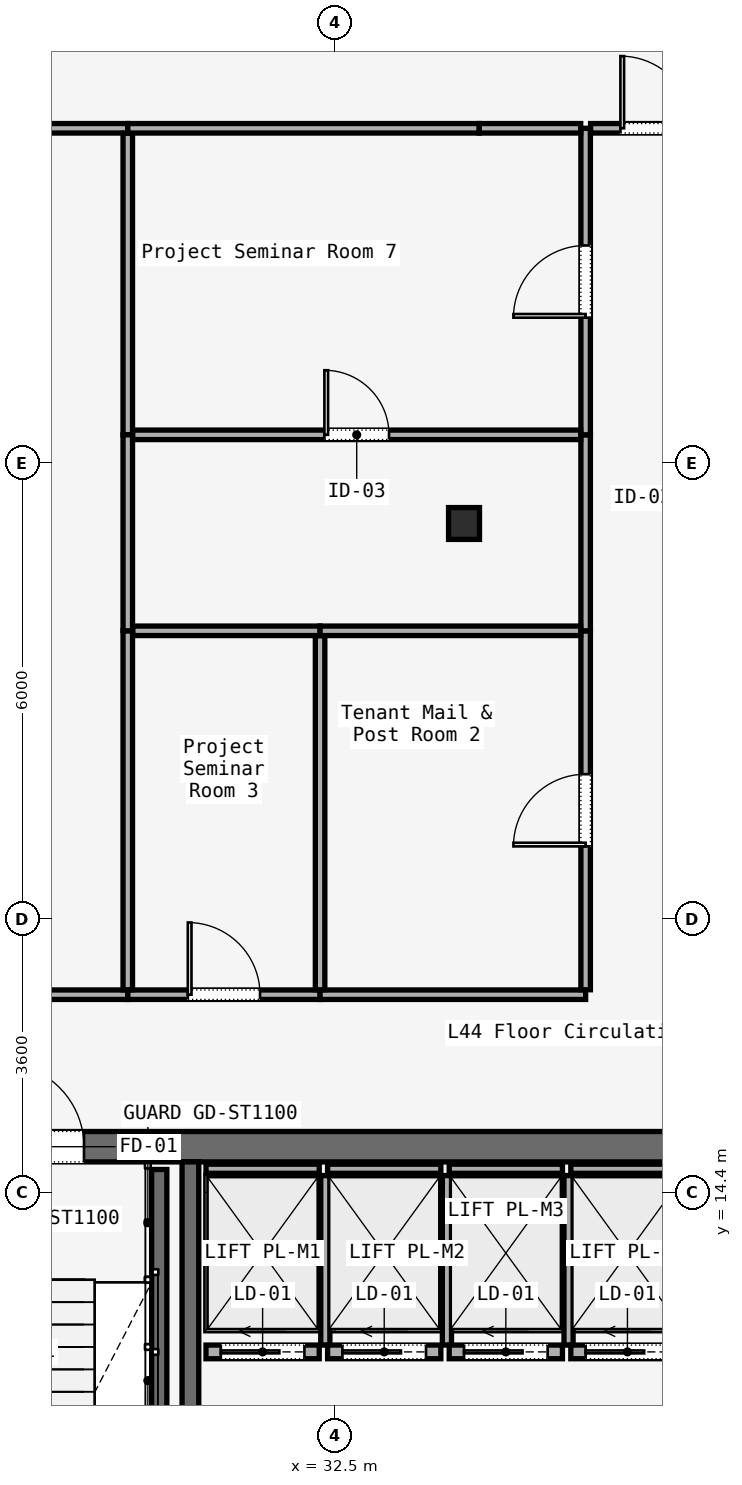
"""IFC4 building model, lengths in metres.
Left out: names, types, materials, properties, quantities, classifications, styles, units other than length and angle.
Written with IfcOpenShell. Run it as: python <this file> out.ifc"""

import sys

from ifc_helpers import new_model, si_unit, direction, frame, frame_2d, origin, origin_2d, place, context, subcontext, project, spatial, rectangle, i_section, extrude, element, fill, save


model = new_model("IFC4")
c1 = context("Model", 3, precision=1e-05, world=origin(), true_north=direction((0.0, 1.0)))
c2 = subcontext(c1, "Body", "Model", "MODEL_VIEW")
j1 = project(units=[si_unit("LENGTHUNIT", "METRE"), si_unit("PLANEANGLEUNIT", "RADIAN")], contexts=[c1])
p1 = place(None, origin())
s1 = spatial("IfcSite", under=j1, at=p1, CompositionType="ELEMENT")
p2 = place(p1, origin())
s2 = spatial("IfcBuilding", under=s1, at=p2, CompositionType="ELEMENT")
p3 = place(p2, frame((0.0, 0.0, 184.0)))
s3 = spatial("IfcBuildingStorey", under=s2, at=p3, CompositionType="ELEMENT", Elevation=184.0)
p4 = place(p3, frame((26.45, 15.0, 0.0), z_axis=(0.0, 0.0, 1.0), x_axis=(1.0, 0.0, 0.0)))
e1 = element("IfcWall", 1, at=p4, inside=s3, PredefinedType="SOLIDWALL", context=c2, shape_type="SweptSolid", body=[
    extrude(rectangle(XDim=31.1, YDim=0.4, at=frame_2d((15.55, 0.0))), origin(), (0.0, 0.0, 1.0), 3.58),
])
p5 = place(p4, frame((1.65, 0.0, 0.0)))
e2 = element("IfcOpeningElement", 2, at=p5, cuts=e1, PredefinedType="OPENING", context=c2, shape_type="SweptSolid", body=[
    extrude(rectangle(XDim=1.1, YDim=2.2, at=frame_2d((0.55, 1.1))), frame((0.0, 0.2, 0.0), z_axis=(0.0, -1.0, 0.0), x_axis=(1.0, 0.0, 0.0)), (0.0, 0.0, 1.0), 0.4),
])
p6 = place(p4, frame((13.65, 0.0, 0.0)))
e3 = element("IfcOpeningElement", 3, at=p6, cuts=e1, PredefinedType="OPENING", context=c2, shape_type="SweptSolid", body=[
    extrude(rectangle(XDim=1.1, YDim=2.2, at=frame_2d((0.55, 1.1))), frame((0.0, 0.2, 0.0), z_axis=(0.0, -1.0, 0.0), x_axis=(1.0, 0.0, 0.0)), (0.0, 0.0, 1.0), 0.4),
])
p7 = place(p4, frame((25.55, 0.0, 0.0)))
e4 = element("IfcOpeningElement", 4, at=p7, cuts=e1, PredefinedType="OPENING", context=c2, shape_type="SweptSolid", body=[
    extrude(rectangle(XDim=1.1, YDim=2.2, at=frame_2d((0.55, 1.1))), frame((0.0, 0.2, 0.0), z_axis=(0.0, -1.0, 0.0), x_axis=(1.0, 0.0, 0.0)), (0.0, 0.0, 1.0), 0.4),
])
p8 = place(p4, frame((10.7, 0.0, 0.0)))
e5 = element("IfcOpeningElement", 5, at=p8, cuts=e1, PredefinedType="OPENING", context=c2, shape_type="SweptSolid", body=[
    extrude(rectangle(XDim=1.4, YDim=2.2, at=frame_2d((0.7, 1.1))), frame((0.0, 0.2, 0.0), z_axis=(0.0, -1.0, 0.0), x_axis=(1.0, 0.0, 0.0)), (0.0, 0.0, 1.0), 0.4),
])
p9 = place(p4, frame((19.35, 0.0, 0.0)))
e6 = element("IfcOpeningElement", 6, at=p9, cuts=e1, PredefinedType="OPENING", context=c2, shape_type="SweptSolid", body=[
    extrude(rectangle(XDim=1.1, YDim=2.2, at=frame_2d((0.55, 1.1))), frame((0.0, 0.2, 0.0), z_axis=(0.0, -1.0, 0.0), x_axis=(1.0, 0.0, 0.0)), (0.0, 0.0, 1.0), 0.4),
])
p10 = place(p4, frame((21.4, 0.0, 0.0)))
e7 = element("IfcOpeningElement", 7, at=p10, cuts=e1, PredefinedType="OPENING", context=c2, shape_type="SweptSolid", body=[
    extrude(rectangle(XDim=0.9, YDim=2.1, at=frame_2d((0.45, 1.05))), frame((0.0, 0.2, 0.0), z_axis=(0.0, -1.0, 0.0), x_axis=(1.0, 0.0, 0.0)), (0.0, 0.0, 1.0), 0.4),
])
p11 = place(p4, frame((23.35, 0.0, 0.0)))
e8 = element("IfcOpeningElement", 8, at=p11, cuts=e1, PredefinedType="OPENING", context=c2, shape_type="SweptSolid", body=[
    extrude(rectangle(XDim=1.3, YDim=2.3, at=frame_2d((0.65, 1.15))), frame((0.0, 0.2, 0.0), z_axis=(0.0, -1.0, 0.0), x_axis=(1.0, 0.0, 0.0)), (0.0, 0.0, 1.0), 0.4),
])
p12 = place(p3, frame((30.6, 5.8, 0.0), z_axis=(0.0, 0.0, 1.0), x_axis=(0.0, 1.0, 0.0)))
e9 = element("IfcWall", 9, at=p12, inside=s3, PredefinedType="SOLIDWALL", context=c2, shape_type="SweptSolid", body=[
    extrude(rectangle(XDim=9.0, YDim=0.22, at=frame_2d((4.5, 0.0))), origin(), (0.0, 0.0, 1.0), 3.58),
])
p13 = place(p3, frame((34.2, 23.2, 0.0), z_axis=(0.0, 0.0, 1.0), x_axis=(1.0, 0.0, 0.0)))
e10 = element("IfcColumn", 10, at=p13, inside=s3, PredefinedType="COLUMN", context=c2, shape_type="SweptSolid", body=[
    extrude(i_section(OverallWidth=0.407, OverallDepth=0.419, WebThickness=0.031, FlangeThickness=0.049, FilletRadius=0.015, at=origin_2d()), origin(), (0.0, 0.0, 1.0), 3.58),
])
p14 = place(p3, frame((30.19, 14.7, 0.0), z_axis=(0.0, 0.0, 1.0), x_axis=(0.0, -1.0, 0.0)))
e11 = element("IfcWall", 11, at=p14, inside=s3, PredefinedType="SOLIDWALL", context=c2, shape_type="SweptSolid", body=[
    extrude(rectangle(XDim=7.65, YDim=0.2, at=frame_2d((3.825, 0.0))), origin(), (0.0, 0.0, 1.0), 3.8),
])
p15 = place(p3, frame((30.805, 12.3, 0.0), z_axis=(0.0, 0.0, 1.0), x_axis=(1.0, 0.0, 0.0)))
e12 = element("IfcWall", 12, at=p15, inside=s3, PredefinedType="SOLIDWALL", context=c2, shape_type="SweptSolid", body=[
    extrude(rectangle(XDim=1.49, YDim=0.18, at=frame_2d((0.745, 0.0))), origin(), (0.0, 0.0, 1.0), 3.01),
])
p16 = place(p15, frame((0.195, 0.0, 0.0)))
e13 = element("IfcOpeningElement", 13, at=p16, cuts=e12, PredefinedType="OPENING", context=c2, shape_type="SweptSolid", body=[
    extrude(rectangle(XDim=1.1, YDim=2.2, at=frame_2d((0.55, 1.1))), frame((0.0, 0.09, 0.0), z_axis=(0.0, -1.0, 0.0), x_axis=(1.0, 0.0, 0.0)), (0.0, 0.0, 1.0), 0.18),
])
p17 = place(p3, frame((30.805, 14.71, 0.0), z_axis=(0.0, 0.0, 1.0), x_axis=(1.0, 0.0, 0.0)))
e14 = element("IfcWall", 14, at=p17, inside=s3, PredefinedType="SOLIDWALL", context=c2, shape_type="SweptSolid", body=[
    extrude(rectangle(XDim=1.49, YDim=0.12, at=frame_2d((0.745, 0.0))), origin(), (0.0, 0.0, 1.0), 3.01),
])
p18 = place(p3, frame((32.375, 12.39, 0.0), z_axis=(0.0, 0.0, 1.0), x_axis=(0.0, 1.0, 0.0)))
e15 = element("IfcWall", 15, at=p18, inside=s3, PredefinedType="SOLIDWALL", context=c2, shape_type="SweptSolid", body=[
    extrude(rectangle(XDim=2.23, YDim=0.12, at=frame_2d((1.115, 0.0))), origin(), (0.0, 0.0, 1.0), 3.01),
])
p19 = place(p3, frame((32.405, 12.3, 0.0), z_axis=(0.0, 0.0, 1.0), x_axis=(1.0, 0.0, 0.0)))
e16 = element("IfcWall", 16, at=p19, inside=s3, PredefinedType="SOLIDWALL", context=c2, shape_type="SweptSolid", body=[
    extrude(rectangle(XDim=1.49, YDim=0.18, at=frame_2d((0.745, 0.0))), origin(), (0.0, 0.0, 1.0), 3.01),
])
p20 = place(p19, frame((0.195, 0.0, 0.0)))
e17 = element("IfcOpeningElement", 17, at=p20, cuts=e16, PredefinedType="OPENING", context=c2, shape_type="SweptSolid", body=[
    extrude(rectangle(XDim=1.1, YDim=2.2, at=frame_2d((0.55, 1.1))), frame((0.0, 0.09, 0.0), z_axis=(0.0, -1.0, 0.0), x_axis=(1.0, 0.0, 0.0)), (0.0, 0.0, 1.0), 0.18),
])
p21 = place(p3, frame((32.405, 14.71, 0.0), z_axis=(0.0, 0.0, 1.0), x_axis=(1.0, 0.0, 0.0)))
e18 = element("IfcWall", 18, at=p21, inside=s3, PredefinedType="SOLIDWALL", context=c2, shape_type="SweptSolid", body=[
    extrude(rectangle(XDim=1.49, YDim=0.12, at=frame_2d((0.745, 0.0))), origin(), (0.0, 0.0, 1.0), 3.01),
])
p22 = place(p3, frame((33.975, 12.39, 0.0), z_axis=(0.0, 0.0, 1.0), x_axis=(0.0, 1.0, 0.0)))
e19 = element("IfcWall", 19, at=p22, inside=s3, PredefinedType="SOLIDWALL", context=c2, shape_type="SweptSolid", body=[
    extrude(rectangle(XDim=2.23, YDim=0.12, at=frame_2d((1.115, 0.0))), origin(), (0.0, 0.0, 1.0), 3.01),
])
p23 = place(p3, frame((34.005, 12.3, 0.0), z_axis=(0.0, 0.0, 1.0), x_axis=(1.0, 0.0, 0.0)))
e20 = element("IfcWall", 20, at=p23, inside=s3, PredefinedType="SOLIDWALL", context=c2, shape_type="SweptSolid", body=[
    extrude(rectangle(XDim=1.49, YDim=0.18, at=frame_2d((0.745, 0.0))), origin(), (0.0, 0.0, 1.0), 3.01),
])
p24 = place(p23, frame((0.195, 0.0, 0.0)))
e21 = element("IfcOpeningElement", 21, at=p24, cuts=e20, PredefinedType="OPENING", context=c2, shape_type="SweptSolid", body=[
    extrude(rectangle(XDim=1.1, YDim=2.2, at=frame_2d((0.55, 1.1))), frame((0.0, 0.09, 0.0), z_axis=(0.0, -1.0, 0.0), x_axis=(1.0, 0.0, 0.0)), (0.0, 0.0, 1.0), 0.18),
])
p25 = place(p3, frame((34.005, 14.71, 0.0), z_axis=(0.0, 0.0, 1.0), x_axis=(1.0, 0.0, 0.0)))
e22 = element("IfcWall", 22, at=p25, inside=s3, PredefinedType="SOLIDWALL", context=c2, shape_type="SweptSolid", body=[
    extrude(rectangle(XDim=1.49, YDim=0.12, at=frame_2d((0.745, 0.0))), origin(), (0.0, 0.0, 1.0), 3.01),
])
p26 = place(p3, frame((35.575, 12.39, 0.0), z_axis=(0.0, 0.0, 1.0), x_axis=(0.0, 1.0, 0.0)))
e23 = element("IfcWall", 23, at=p26, inside=s3, PredefinedType="SOLIDWALL", context=c2, shape_type="SweptSolid", body=[
    extrude(rectangle(XDim=2.23, YDim=0.12, at=frame_2d((1.115, 0.0))), origin(), (0.0, 0.0, 1.0), 3.01),
])
p27 = place(p3, frame((35.605, 12.3, 0.0), z_axis=(0.0, 0.0, 1.0), x_axis=(1.0, 0.0, 0.0)))
e24 = element("IfcWall", 24, at=p27, inside=s3, PredefinedType="SOLIDWALL", context=c2, shape_type="SweptSolid", body=[
    extrude(rectangle(XDim=1.49, YDim=0.18, at=frame_2d((0.745, 0.0))), origin(), (0.0, 0.0, 1.0), 3.01),
])
p28 = place(p27, frame((0.195, 0.0, 0.0)))
e25 = element("IfcOpeningElement", 25, at=p28, cuts=e24, PredefinedType="OPENING", context=c2, shape_type="SweptSolid", body=[
    extrude(rectangle(XDim=1.1, YDim=2.2, at=frame_2d((0.55, 1.1))), frame((0.0, 0.09, 0.0), z_axis=(0.0, -1.0, 0.0), x_axis=(1.0, 0.0, 0.0)), (0.0, 0.0, 1.0), 0.18),
])
p29 = place(p3, frame((35.605, 14.71, 0.0), z_axis=(0.0, 0.0, 1.0), x_axis=(1.0, 0.0, 0.0)))
e26 = element("IfcWall", 26, at=p29, inside=s3, PredefinedType="SOLIDWALL", context=c2, shape_type="SweptSolid", body=[
    extrude(rectangle(XDim=1.49, YDim=0.12, at=frame_2d((0.745, 0.0))), origin(), (0.0, 0.0, 1.0), 3.01),
])
p30 = place(p3, frame((26.4, 17.0, 0.0), z_axis=(0.0, 0.0, 1.0), x_axis=(1.0, 0.0, 0.0)))
e27 = element("IfcWall", 27, at=p30, inside=s3, PredefinedType="PARTITIONING", context=c2, shape_type="SweptSolid", body=[
    extrude(rectangle(XDim=3.376, YDim=0.125, at=frame_2d((1.688, 0.0))), origin(), (0.0, 0.0, 1.0), 3.01),
])
p31 = place(p30, frame((1.213, 0.0, 0.0)))
e28 = element("IfcOpeningElement", 28, at=p31, cuts=e27, PredefinedType="OPENING", context=c2, shape_type="SweptSolid", body=[
    extrude(rectangle(XDim=0.95, YDim=2.2, at=frame_2d((0.475, 1.1))), frame((0.0, 0.062, 0.0), z_axis=(0.0, -1.0, 0.0), x_axis=(1.0, 0.0, 0.0)), (0.0, 0.0, 1.0), 0.125),
])
p32 = place(p3, frame((29.776, 17.0, 0.0), z_axis=(0.0, 0.0, 1.0), x_axis=(1.0, 0.0, 0.0)))
e29 = element("IfcWall", 29, at=p32, inside=s3, PredefinedType="PARTITIONING", context=c2, shape_type="SweptSolid", body=[
    extrude(rectangle(XDim=2.53, YDim=0.125, at=frame_2d((1.265, 0.0))), origin(), (0.0, 0.0, 1.0), 3.01),
])
p33 = place(p32, frame((0.79, 0.0, 0.0)))
e30 = element("IfcOpeningElement", 30, at=p33, cuts=e29, PredefinedType="OPENING", context=c2, shape_type="SweptSolid", body=[
    extrude(rectangle(XDim=0.95, YDim=2.2, at=frame_2d((0.475, 1.1))), frame((0.0, 0.062, 0.0), z_axis=(0.0, -1.0, 0.0), x_axis=(1.0, 0.0, 0.0)), (0.0, 0.0, 1.0), 0.125),
])
p34 = place(p3, frame((32.306, 17.0, 0.0), z_axis=(0.0, 0.0, 1.0), x_axis=(1.0, 0.0, 0.0)))
e31 = element("IfcWall", 31, at=p34, inside=s3, PredefinedType="PARTITIONING", context=c2, shape_type="SweptSolid", body=[
    extrude(rectangle(XDim=3.494, YDim=0.125, at=frame_2d((1.747, 0.0))), origin(), (0.0, 0.0, 1.0), 3.01),
])
p35 = place(p3, frame((35.8, 17.065, 0.0), z_axis=(0.0, 0.0, 1.0), x_axis=(0.0, 1.0, 0.0)))
e32 = element("IfcWall", 32, at=p35, inside=s3, PredefinedType="PARTITIONING", context=c2, shape_type="SweptSolid", body=[
    extrude(rectangle(XDim=4.723, YDim=0.125, at=frame_2d((2.362, 0.0))), origin(), (0.0, 0.0, 1.0), 3.01),
])
p36 = place(p35, frame((1.886, 0.0, 0.0)))
e33 = element("IfcOpeningElement", 33, at=p36, cuts=e32, PredefinedType="OPENING", context=c2, shape_type="SweptSolid", body=[
    extrude(rectangle(XDim=0.95, YDim=2.2, at=frame_2d((0.475, 1.1))), frame((0.0, 0.062, 0.0), z_axis=(0.0, -1.0, 0.0), x_axis=(1.0, 0.0, 0.0)), (0.0, 0.0, 1.0), 0.125),
])
p37 = place(p3, frame((35.8, 21.788, 0.0), z_axis=(0.0, 0.0, 1.0), x_axis=(0.0, 1.0, 0.0)))
e34 = element("IfcWall", 34, at=p37, inside=s3, PredefinedType="PARTITIONING", context=c2, shape_type="SweptSolid", body=[
    extrude(rectangle(XDim=2.579, YDim=0.125, at=frame_2d((1.289, 0.0))), origin(), (0.0, 0.0, 1.0), 3.01),
])
p38 = place(p3, frame((35.8, 24.367, 0.0), z_axis=(0.0, 0.0, 1.0), x_axis=(0.0, 1.0, 0.0)))
e35 = element("IfcWall", 35, at=p38, inside=s3, PredefinedType="PARTITIONING", context=c2, shape_type="SweptSolid", body=[
    extrude(rectangle(XDim=4.033, YDim=0.125, at=frame_2d((2.017, 0.0))), origin(), (0.0, 0.0, 1.0), 3.01),
])
p39 = place(p38, frame((1.542, 0.0, 0.0)))
e36 = element("IfcOpeningElement", 36, at=p39, cuts=e35, PredefinedType="OPENING", context=c2, shape_type="SweptSolid", body=[
    extrude(rectangle(XDim=0.95, YDim=2.2, at=frame_2d((0.475, 1.1))), frame((0.0, 0.062, 0.0), z_axis=(0.0, -1.0, 0.0), x_axis=(1.0, 0.0, 0.0)), (0.0, 0.0, 1.0), 0.125),
])
p40 = place(p3, frame((35.865, 28.4, 0.0), z_axis=(0.0, 0.0, 1.0), x_axis=(1.0, 0.0, 0.0)))
e37 = element("IfcWall", 37, at=p40, inside=s3, PredefinedType="PARTITIONING", context=c2, shape_type="SweptSolid", body=[
    extrude(rectangle(XDim=1.735, YDim=0.125, at=frame_2d((0.868, 0.0))), origin(), (0.0, 0.0, 1.0), 3.01),
])
p41 = place(p40, frame((0.393, 0.0, 0.0)))
e38 = element("IfcOpeningElement", 38, at=p41, cuts=e37, PredefinedType="OPENING", context=c2, shape_type="SweptSolid", body=[
    extrude(rectangle(XDim=0.95, YDim=2.2, at=frame_2d((0.475, 1.1))), frame((0.0, 0.062, 0.0), z_axis=(0.0, -1.0, 0.0), x_axis=(1.0, 0.0, 0.0)), (0.0, 0.0, 1.0), 0.125),
])
p42 = place(p3, frame((29.776, 17.065, 0.0), z_axis=(0.0, 0.0, 1.0), x_axis=(0.0, 1.0, 0.0)))
e39 = element("IfcWall", 39, at=p42, inside=s3, PredefinedType="PARTITIONING", context=c2, shape_type="SweptSolid", body=[
    extrude(rectangle(XDim=4.723, YDim=0.125, at=frame_2d((2.362, 0.0))), origin(), (0.0, 0.0, 1.0), 3.01),
])
p43 = place(p3, frame((29.841, 21.788, 0.0), z_axis=(0.0, 0.0, 1.0), x_axis=(1.0, 0.0, 0.0)))
e40 = element("IfcWall", 40, at=p43, inside=s3, PredefinedType="PARTITIONING", context=c2, shape_type="SweptSolid", body=[
    extrude(rectangle(XDim=2.465, YDim=0.125, at=frame_2d((1.232, 0.0))), origin(), (0.0, 0.0, 1.0), 3.01),
])
p44 = place(p3, frame((32.306, 21.723, 0.0), z_axis=(0.0, 0.0, 1.0), x_axis=(0.0, -1.0, 0.0)))
e41 = element("IfcWall", 41, at=p44, inside=s3, PredefinedType="PARTITIONING", context=c2, shape_type="SweptSolid", body=[
    extrude(rectangle(XDim=4.658, YDim=0.125, at=frame_2d((2.329, 0.0))), origin(), (0.0, 0.0, 1.0), 3.01),
])
p45 = place(p3, frame((32.306, 21.788, 0.0), z_axis=(0.0, 0.0, 1.0), x_axis=(1.0, 0.0, 0.0)))
e42 = element("IfcWall", 42, at=p45, inside=s3, PredefinedType="PARTITIONING", context=c2, shape_type="SweptSolid", body=[
    extrude(rectangle(XDim=3.429, YDim=0.125, at=frame_2d((1.714, 0.0))), origin(), (0.0, 0.0, 1.0), 3.01),
])
p46 = place(p3, frame((26.936, 28.4, 0.0), z_axis=(0.0, 0.0, 1.0), x_axis=(1.0, 0.0, 0.0)))
e43 = element("IfcWall", 43, at=p46, inside=s3, PredefinedType="PARTITIONING", context=c2, shape_type="SweptSolid", body=[
    extrude(rectangle(XDim=2.84, YDim=0.125, at=frame_2d((1.42, 0.0))), origin(), (0.0, 0.0, 1.0), 3.01),
])
p47 = place(p3, frame((29.776, 28.335, 0.0), z_axis=(0.0, 0.0, 1.0), x_axis=(0.0, -1.0, 0.0)))
e44 = element("IfcWall", 44, at=p47, inside=s3, PredefinedType="PARTITIONING", context=c2, shape_type="SweptSolid", body=[
    extrude(rectangle(XDim=3.968, YDim=0.125, at=frame_2d((1.984, 0.0))), origin(), (0.0, 0.0, 1.0), 3.01),
])
p48 = place(p3, frame((29.776, 24.367, 0.0), z_axis=(0.0, 0.0, 1.0), x_axis=(0.0, -1.0, 0.0)))
e45 = element("IfcWall", 45, at=p48, inside=s3, PredefinedType="PARTITIONING", context=c2, shape_type="SweptSolid", body=[
    extrude(rectangle(XDim=2.579, YDim=0.125, at=frame_2d((1.289, 0.0))), origin(), (0.0, 0.0, 1.0), 3.01),
])
p49 = place(p3, frame((29.841, 24.367, 0.0), z_axis=(0.0, 0.0, 1.0), x_axis=(1.0, 0.0, 0.0)))
e46 = element("IfcWall", 46, at=p49, inside=s3, PredefinedType="PARTITIONING", context=c2, shape_type="SweptSolid", body=[
    extrude(rectangle(XDim=5.894, YDim=0.125, at=frame_2d((2.947, 0.0))), origin(), (0.0, 0.0, 1.0), 3.01),
])
p50 = place(p49, frame((2.522, 0.0, 0.0)))
e47 = element("IfcOpeningElement", 47, at=p50, cuts=e46, PredefinedType="OPENING", context=c2, shape_type="SweptSolid", body=[
    extrude(rectangle(XDim=0.85, YDim=2.15, at=frame_2d((0.425, 1.075))), frame((0.0, 0.062, 0.0), z_axis=(0.0, -1.0, 0.0), x_axis=(1.0, 0.0, 0.0)), (0.0, 0.0, 1.0), 0.125),
])
p51 = place(p3, frame((29.776, 28.4, 0.0), z_axis=(0.0, 0.0, 1.0), x_axis=(1.0, 0.0, 0.0)))
e48 = element("IfcWall", 48, at=p51, inside=s3, PredefinedType="PARTITIONING", context=c2, shape_type="SweptSolid", body=[
    extrude(rectangle(XDim=4.624, YDim=0.125, at=frame_2d((2.312, 0.0))), origin(), (0.0, 0.0, 1.0), 3.01),
])
p52 = place(p3, frame((34.4, 28.4, 0.0), z_axis=(0.0, 0.0, 1.0), x_axis=(1.0, 0.0, 0.0)))
e49 = element("IfcWall", 49, at=p52, inside=s3, PredefinedType="PARTITIONING", context=c2, shape_type="SweptSolid", body=[
    extrude(rectangle(XDim=1.335, YDim=0.125, at=frame_2d((0.667, 0.0))), origin(), (0.0, 0.0, 1.0), 3.01),
])
p53 = place(p5, origin())
e50 = element("IfcDoor", 50, at=p53, inside=s3, OperationType="SINGLE_SWING_LEFT", PredefinedType="DOOR", context=c2, shape_type="SweptSolid", body=[
    extrude(rectangle(XDim=1.1, YDim=2.2, at=frame_2d((0.55, 1.1))), frame((0.0, 0.025, 0.0), z_axis=(0.0, -1.0, 0.0), x_axis=(1.0, 0.0, 0.0)), (0.0, 0.0, 1.0), 0.05),
])
fill(e2, e50)
p54 = place(p16, origin())
e51 = element("IfcDoor", 51, at=p54, inside=s3, OperationType="SLIDING_TO_LEFT", PredefinedType="DOOR", context=c2, shape_type="SweptSolid", body=[
    extrude(rectangle(XDim=1.1, YDim=2.2, at=frame_2d((0.55, 1.1))), frame((0.0, 0.025, 0.0), z_axis=(0.0, -1.0, 0.0), x_axis=(1.0, 0.0, 0.0)), (0.0, 0.0, 1.0), 0.05),
])
fill(e13, e51)
p55 = place(p20, origin())
e52 = element("IfcDoor", 52, at=p55, inside=s3, OperationType="SLIDING_TO_LEFT", PredefinedType="DOOR", context=c2, shape_type="SweptSolid", body=[
    extrude(rectangle(XDim=1.1, YDim=2.2, at=frame_2d((0.55, 1.1))), frame((0.0, 0.025, 0.0), z_axis=(0.0, -1.0, 0.0), x_axis=(1.0, 0.0, 0.0)), (0.0, 0.0, 1.0), 0.05),
])
fill(e17, e52)
p56 = place(p24, origin())
e53 = element("IfcDoor", 53, at=p56, inside=s3, OperationType="SLIDING_TO_LEFT", PredefinedType="DOOR", context=c2, shape_type="SweptSolid", body=[
    extrude(rectangle(XDim=1.1, YDim=2.2, at=frame_2d((0.55, 1.1))), frame((0.0, 0.025, 0.0), z_axis=(0.0, -1.0, 0.0), x_axis=(1.0, 0.0, 0.0)), (0.0, 0.0, 1.0), 0.05),
])
fill(e21, e53)
p57 = place(p28, origin())
e54 = element("IfcDoor", 54, at=p57, inside=s3, OperationType="SLIDING_TO_LEFT", PredefinedType="DOOR", context=c2, shape_type="SweptSolid", body=[
    extrude(rectangle(XDim=1.1, YDim=2.2, at=frame_2d((0.55, 1.1))), frame((0.0, 0.025, 0.0), z_axis=(0.0, -1.0, 0.0), x_axis=(1.0, 0.0, 0.0)), (0.0, 0.0, 1.0), 0.05),
])
fill(e25, e54)
p58 = place(p33, origin())
e55 = element("IfcDoor", 55, at=p58, inside=s3, OperationType="SINGLE_SWING_RIGHT", PredefinedType="DOOR", context=c2, shape_type="SweptSolid", body=[
    extrude(rectangle(XDim=0.95, YDim=2.2, at=frame_2d((0.475, 1.1))), frame((0.0, 0.025, 0.0), z_axis=(0.0, -1.0, 0.0), x_axis=(1.0, 0.0, 0.0)), (0.0, 0.0, 1.0), 0.05),
])
fill(e30, e55)
p59 = place(p36, origin())
e56 = element("IfcDoor", 56, at=p59, inside=s3, OperationType="SINGLE_SWING_LEFT", PredefinedType="DOOR", context=c2, shape_type="SweptSolid", body=[
    extrude(rectangle(XDim=0.95, YDim=2.2, at=frame_2d((0.475, 1.1))), frame((0.0, 0.025, 0.0), z_axis=(0.0, -1.0, 0.0), x_axis=(1.0, 0.0, 0.0)), (0.0, 0.0, 1.0), 0.05),
])
fill(e33, e56)
p60 = place(p50, origin())
e57 = element("IfcDoor", 57, at=p60, inside=s3, OperationType="SINGLE_SWING_LEFT", PredefinedType="DOOR", context=c2, shape_type="SweptSolid", body=[
    extrude(rectangle(XDim=0.85, YDim=2.15, at=frame_2d((0.425, 1.075))), frame((0.0, 0.025, 0.0), z_axis=(0.0, -1.0, 0.0), x_axis=(1.0, 0.0, 0.0)), (0.0, 0.0, 1.0), 0.05),
])
fill(e47, e57)
p61 = place(p39, origin())
e58 = element("IfcDoor", 58, at=p61, inside=s3, OperationType="SINGLE_SWING_RIGHT", PredefinedType="DOOR", context=c2, shape_type="SweptSolid", body=[
    extrude(rectangle(XDim=0.95, YDim=2.2, at=frame_2d((0.475, 1.1))), frame((0.0, 0.025, 0.0), z_axis=(0.0, -1.0, 0.0), x_axis=(1.0, 0.0, 0.0)), (0.0, 0.0, 1.0), 0.05),
])
fill(e36, e58)
p62 = place(p41, origin())
e59 = element("IfcDoor", 59, at=p62, inside=s3, OperationType="SINGLE_SWING_RIGHT", PredefinedType="DOOR", context=c2, shape_type="SweptSolid", body=[
    extrude(rectangle(XDim=0.95, YDim=2.2, at=frame_2d((0.475, 1.1))), frame((0.0, 0.025, 0.0), z_axis=(0.0, -1.0, 0.0), x_axis=(1.0, 0.0, 0.0)), (0.0, 0.0, 1.0), 0.05),
])
fill(e38, e59)
save(model, sys.argv[1])
